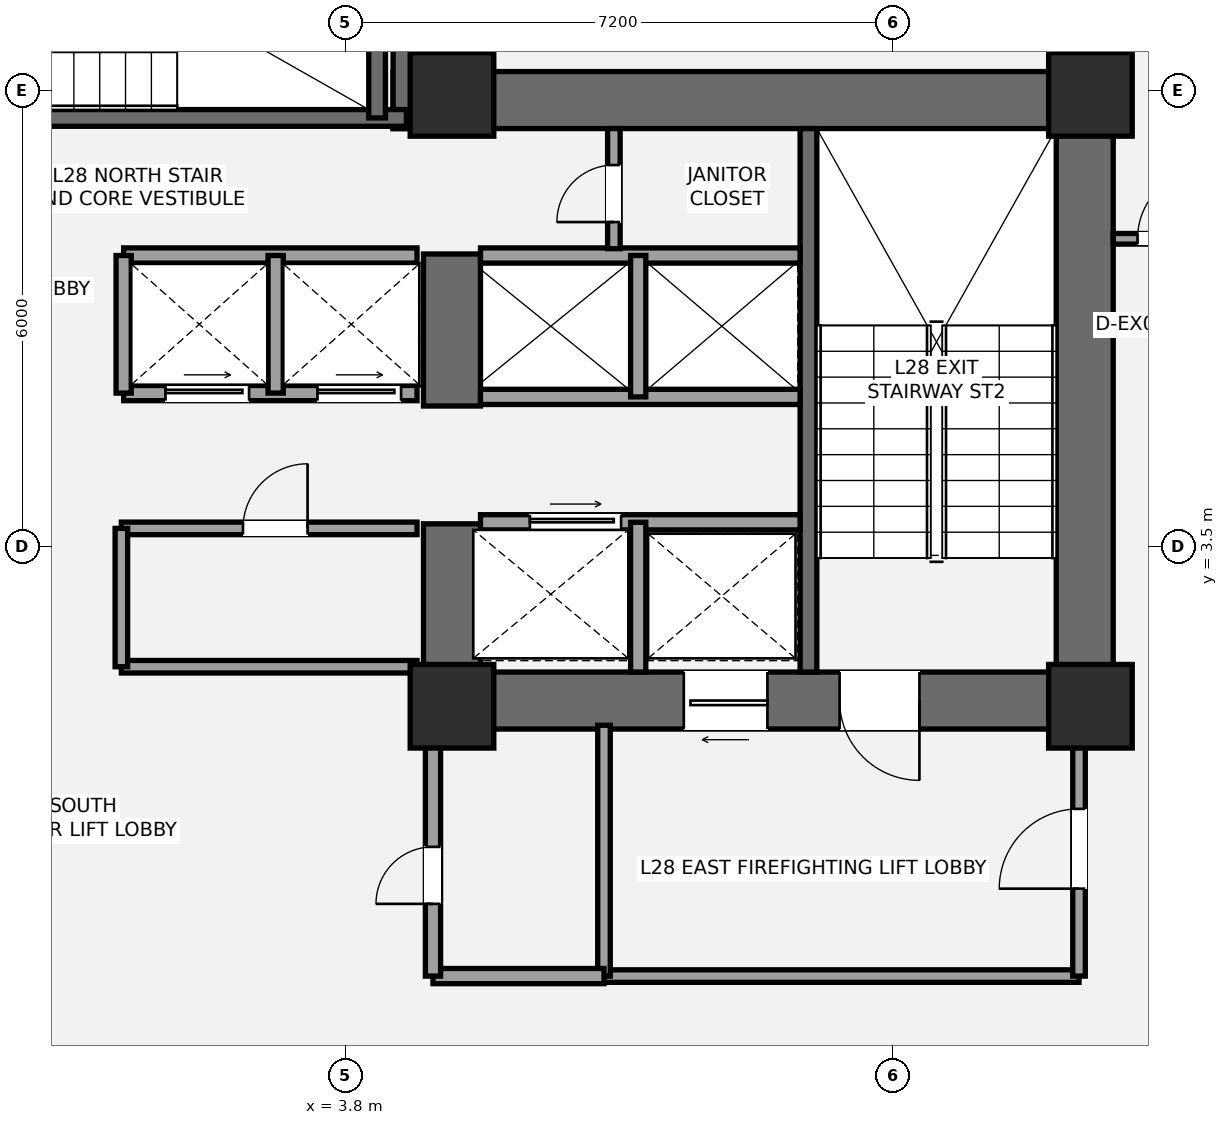
"""IFC4 building model, lengths in metres.
Left out: names, types, materials, properties, quantities, classifications, styles, units other than length and angle.
Written with IfcOpenShell. Run it as: python <this file> out.ifc"""

import sys

from ifc_helpers import new_model, si_unit, direction, frame, frame_2d, origin, origin_2d, place, context, subcontext, project, spatial, rectangle, extrude, element, fill, save


model = new_model("IFC4")
c1 = context("Model", 3, precision=1e-05, world=origin(), true_north=direction((0.0, 1.0)))
c2 = subcontext(c1, "Body", "Model", "MODEL_VIEW")
j1 = project(units=[si_unit("LENGTHUNIT", "METRE"), si_unit("PLANEANGLEUNIT", "RADIAN")], contexts=[c1])
p1 = place(None, origin())
s1 = spatial("IfcSite", under=j1, at=p1, CompositionType="ELEMENT")
p2 = place(p1, origin())
s2 = spatial("IfcBuilding", under=s1, at=p2, CompositionType="ELEMENT")
p3 = place(p2, frame((0.0, 0.0, 107.1)))
s3 = spatial("IfcBuildingStorey", under=s2, at=p3, CompositionType="ELEMENT", Elevation=107.1)
p4 = place(p3, frame((13.525, 1.1, 0.0), z_axis=(0.0, 0.0, 1.0), x_axis=(0.0, 1.0, 0.0)))
e1 = element("IfcWall", 1, at=p4, inside=s3, PredefinedType="SHEAR", context=c2, shape_type="SweptSolid", body=[
    extrude(rectangle(XDim=8.65, YDim=0.75, at=frame_2d((4.325, 0.0))), origin(), (0.0, 0.0, 1.0), 3.5),
])
p5 = place(p3, frame((4.425, 9.375, 0.0), z_axis=(0.0, 0.0, 1.0), x_axis=(1.0, 0.0, 0.0)))
e2 = element("IfcWall", 2, at=p5, inside=s3, PredefinedType="SHEAR", context=c2, shape_type="SweptSolid", body=[
    extrude(rectangle(XDim=9.475, YDim=0.75, at=frame_2d((4.737, 0.0))), origin(), (0.0, 0.0, 1.0), 3.5),
])
p6 = place(p3, frame((13.9, 1.475, 0.0), z_axis=(0.0, 0.0, 1.0), x_axis=(-1.0, 0.0, 0.0)))
e3 = element("IfcWall", 3, at=p6, inside=s3, PredefinedType="SHEAR", context=c2, shape_type="SweptSolid", body=[
    extrude(rectangle(XDim=9.075, YDim=0.75, at=frame_2d((4.538, 0.0))), origin(), (0.0, 0.0, 1.0), 3.5),
])
p7 = place(p6, frame((2.55, 0.0, 0.0)))
e4 = element("IfcOpeningElement", 4, at=p7, cuts=e3, PredefinedType="OPENING", context=c2, shape_type="SweptSolid", body=[
    extrude(rectangle(XDim=1.05, YDim=2.15, at=frame_2d((0.525, 1.075))), frame((0.0, 0.385, 0.0), z_axis=(0.0, -1.0, 0.0), x_axis=(1.0, 0.0, 0.0)), (0.0, 0.0, 1.0), 0.77),
])
p8 = place(p6, frame((4.55, 0.0, 0.0)))
e5 = element("IfcOpeningElement", 5, at=p8, cuts=e3, PredefinedType="OPENING", context=c2, shape_type="SweptSolid", body=[
    extrude(rectangle(XDim=1.1, YDim=2.2, at=frame_2d((0.55, 1.1))), frame((0.0, 0.385, 0.0), z_axis=(0.0, -1.0, 0.0), x_axis=(1.0, 0.0, 0.0)), (0.0, 0.0, 1.0), 0.77),
])
p9 = place(p3, frame((5.2, 1.1, 0.0), z_axis=(0.0, 0.0, 1.0), x_axis=(0.0, 1.0, 0.0)))
e6 = element("IfcWall", 6, at=p9, inside=s3, PredefinedType="SHEAR", context=c2, shape_type="SweptSolid", body=[
    extrude(rectangle(XDim=2.7, YDim=0.75, at=frame_2d((1.35, 0.0))), origin(), (0.0, 0.0, 1.0), 3.5),
])
p10 = place(p3, frame((5.2, 5.35, 0.0), z_axis=(0.0, 0.0, 1.0), x_axis=(0.0, 1.0, 0.0)))
e7 = element("IfcWall", 7, at=p10, inside=s3, PredefinedType="SHEAR", context=c2, shape_type="SweptSolid", body=[
    extrude(rectangle(XDim=2.0, YDim=0.75, at=frame_2d((1.0, 0.0))), origin(), (0.0, 0.0, 1.0), 3.5),
])
p11 = place(p3, frame((9.89, 1.85, 0.0), z_axis=(0.0, 0.0, 1.0), x_axis=(0.0, 1.0, 0.0)))
e8 = element("IfcWall", 8, at=p11, inside=s3, PredefinedType="SHEAR", context=c2, shape_type="SweptSolid", body=[
    extrude(rectangle(XDim=7.15, YDim=0.22, at=frame_2d((3.575, 0.0))), origin(), (0.0, 0.0, 1.0), 3.5),
])
p12 = place(p3, frame((4.8, 9.0, 0.0), z_axis=(0.0, 0.0, 1.0), x_axis=(0.0, 1.0, 0.0)))
e9 = element("IfcWall", 9, at=p12, inside=s3, PredefinedType="SHEAR", context=c2, shape_type="SweptSolid", body=[
    extrude(rectangle(XDim=4.15, YDim=0.75, at=frame_2d((2.075, 0.0))), origin(), (0.0, 0.0, 1.0), 3.5),
])
p13 = place(p3, frame((-4.7, 9.14, 0.0), z_axis=(0.0, 0.0, 1.0), x_axis=(1.0, 0.0, 0.0)))
e10 = element("IfcWall", 10, at=p13, inside=s3, PredefinedType="SHEAR", context=c2, shape_type="SweptSolid", body=[
    extrude(rectangle(XDim=9.3, YDim=0.22, at=frame_2d((4.65, 0.0))), origin(), (0.0, 0.0, 1.0), 3.5),
])
p14 = place(p13, frame((1.15, 0.0, 0.0)))
e11 = element("IfcOpeningElement", 11, at=p14, cuts=e10, PredefinedType="OPENING", context=c2, shape_type="SweptSolid", body=[
    extrude(rectangle(XDim=1.05, YDim=2.15, at=frame_2d((0.525, 1.075))), frame((0.0, 0.12, 0.0), z_axis=(0.0, -1.0, 0.0), x_axis=(1.0, 0.0, 0.0)), (0.0, 0.0, 1.0), 0.24),
])
p15 = place(p3, frame((4.215, 9.14, 0.0), z_axis=(0.0, 0.0, 1.0), x_axis=(0.0, 1.0, 0.0)))
e12 = element("IfcWall", 12, at=p15, inside=s3, PredefinedType="SHEAR", context=c2, shape_type="SweptSolid", body=[
    extrude(rectangle(XDim=3.26, YDim=0.22, at=frame_2d((1.63, 0.0))), origin(), (0.0, 0.0, 1.0), 3.5),
])
for number, where, z_axis, x_axis in (
    (13, (5.2, 1.4, 0.0), (0.0, 0.0, 1.0), (1.0, 0.0, 0.0)),
    (14, (5.2, 9.45, 0.0), (0.0, 0.0, 1.0), (1.0, 0.0, 0.0)),
    (15, (13.6, 1.4, 0.0), (0.0, 0.0, 1.0), (1.0, 0.0, 0.0)),
    (16, (13.6, 9.45, 0.0), (0.0, 0.0, 1.0), (1.0, 0.0, 0.0)),
):
    element("IfcColumn", number, at=place(p3, frame(where, z_axis=z_axis, x_axis=x_axis)), inside=s3, PredefinedType="COLUMN", context=c2, shape_type="SweptSolid", body=[
        extrude(rectangle(XDim=1.1, YDim=1.1, at=origin_2d()), origin(), (0.0, 0.0, 1.0), 3.5),
    ])
p16 = place(p3, frame((7.2, -2.15, 0.0), z_axis=(0.0, 0.0, 1.0), x_axis=(1.0, 0.0, 0.0)))
e17 = element("IfcWall", 17, at=p16, inside=s3, PredefinedType="PARTITIONING", context=c2, shape_type="SweptSolid", body=[
    extrude(rectangle(XDim=6.25, YDim=0.165, at=frame_2d((3.125, 0.0))), origin(), (0.0, 0.0, 1.0), 3.31),
])
p17 = place(p3, frame((7.2, -2.15, 0.0), z_axis=(0.0, 0.0, 1.0), x_axis=(0.0, 1.0, 0.0)))
e18 = element("IfcWall", 18, at=p17, inside=s3, PredefinedType="PARTITIONING", context=c2, shape_type="SweptSolid", body=[
    extrude(rectangle(XDim=3.3, YDim=0.165, at=frame_2d((1.65, 0.0))), origin(), (0.0, 0.0, 1.0), 3.31),
])
p18 = place(p3, frame((13.45, -2.15, 0.0), z_axis=(0.0, 0.0, 1.0), x_axis=(0.0, 1.0, 0.0)))
e19 = element("IfcWall", 19, at=p18, inside=s3, PredefinedType="PARTITIONING", context=c2, shape_type="SweptSolid", body=[
    extrude(rectangle(XDim=3.3, YDim=0.165, at=frame_2d((1.65, 0.0))), origin(), (0.0, 0.0, 1.0), 2.763),
])
p19 = place(p18, frame((1.15, 0.0, 0.0)))
e20 = element("IfcOpeningElement", 20, at=p19, cuts=e19, PredefinedType="OPENING", context=c2, shape_type="SweptSolid", body=[
    extrude(rectangle(XDim=1.05, YDim=2.15, at=frame_2d((0.525, 1.075))), frame((0.0, 0.093, 0.0), z_axis=(0.0, -1.0, 0.0), x_axis=(1.0, 0.0, 0.0)), (0.0, 0.0, 1.0), 0.185),
])
p20 = place(p3, frame((4.95, -2.15, 0.0), z_axis=(0.0, 0.0, 1.0), x_axis=(1.0, 0.0, 0.0)))
e21 = element("IfcWall", 21, at=p20, inside=s3, PredefinedType="SOLIDWALL", context=c2, shape_type="SweptSolid", body=[
    extrude(rectangle(XDim=2.25, YDim=0.2, at=frame_2d((1.125, 0.0))), origin(), (0.0, 0.0, 1.0), 2.763),
])
p21 = place(p3, frame((4.95, -2.15, 0.0), z_axis=(0.0, 0.0, 1.0), x_axis=(0.0, 1.0, 0.0)))
e22 = element("IfcWall", 22, at=p21, inside=s3, PredefinedType="SOLIDWALL", context=c2, shape_type="SweptSolid", body=[
    extrude(rectangle(XDim=3.3, YDim=0.2, at=frame_2d((1.65, 0.0))), origin(), (0.0, 0.0, 1.0), 3.31),
])
p22 = place(p21, frame((0.95, 0.0, 0.0)))
e23 = element("IfcOpeningElement", 23, at=p22, cuts=e22, PredefinedType="OPENING", context=c2, shape_type="SweptSolid", body=[
    extrude(rectangle(XDim=0.75, YDim=2.1, at=frame_2d((0.375, 1.05))), frame((0.0, 0.11, 0.0), z_axis=(0.0, -1.0, 0.0), x_axis=(1.0, 0.0, 0.0)), (0.0, 0.0, 1.0), 0.22),
])
p23 = place(p3, frame((5.575, 3.82, 0.0), z_axis=(0.0, 0.0, 1.0), x_axis=(1.0, 0.0, 0.0)))
e24 = element("IfcWall", 24, at=p23, inside=s3, PredefinedType="SOLIDWALL", context=c2, shape_type="SweptSolid", body=[
    extrude(rectangle(XDim=4.205, YDim=0.2, at=frame_2d((2.103, 0.0))), origin(), (0.0, 0.0, 1.0), 3.31),
])
p24 = place(p23, frame((0.65, 0.0, 0.0)))
e25 = element("IfcOpeningElement", 25, at=p24, cuts=e24, PredefinedType="OPENING", context=c2, shape_type="SweptSolid", body=[
    extrude(rectangle(XDim=1.2, YDim=2.2, at=frame_2d((0.6, 1.1))), frame((0.0, 0.11, 0.0), z_axis=(0.0, -1.0, 0.0), x_axis=(1.0, 0.0, 0.0)), (0.0, 0.0, 1.0), 0.22),
])
p25 = place(p3, frame((7.65, 1.85, 0.0), z_axis=(0.0, 0.0, 1.0), x_axis=(0.0, 1.0, 0.0)))
e26 = element("IfcWall", 26, at=p25, inside=s3, PredefinedType="SOLIDWALL", context=c2, shape_type="SweptSolid", body=[
    extrude(rectangle(XDim=1.97, YDim=0.2, at=frame_2d((0.985, 0.0))), origin(), (0.0, 0.0, 1.0), 3.31),
])
for number, where, z_axis, x_axis in (
    (27, (5.575, 5.47, 0.0), (0.0, 0.0, 1.0), (1.0, 0.0, 0.0)),
    (28, (5.575, 7.33, 0.0), (0.0, 0.0, 1.0), (1.0, 0.0, 0.0)),
):
    element("IfcWall", number, at=place(p3, frame(where, z_axis=z_axis, x_axis=x_axis)), inside=s3, PredefinedType="SOLIDWALL", context=c2, shape_type="SweptSolid", body=[
        extrude(rectangle(XDim=4.205, YDim=0.2, at=frame_2d((2.103, 0.0))), origin(), (0.0, 0.0, 1.0), 3.31),
    ])
p26 = place(p3, frame((7.65, 5.47, 0.0), z_axis=(0.0, 0.0, 1.0), x_axis=(0.0, 1.0, 0.0)))
e29 = element("IfcWall", 29, at=p26, inside=s3, PredefinedType="SOLIDWALL", context=c2, shape_type="SweptSolid", body=[
    extrude(rectangle(XDim=1.86, YDim=0.2, at=frame_2d((0.93, 0.0))), origin(), (0.0, 0.0, 1.0), 3.31),
])
p27 = place(p3, frame((0.85, 1.92, 0.0), z_axis=(0.0, 0.0, 1.0), x_axis=(1.0, 0.0, 0.0)))
e30 = element("IfcWall", 30, at=p27, inside=s3, PredefinedType="PARTITIONING", context=c2, shape_type="SweptSolid", body=[
    extrude(rectangle(XDim=3.89, YDim=0.165, at=frame_2d((1.945, 0.0))), origin(), (0.0, 0.0, 1.0), 2.3),
])
p28 = place(p3, frame((0.85, 3.74, 0.0), z_axis=(0.0, 0.0, 1.0), x_axis=(1.0, 0.0, 0.0)))
e31 = element("IfcWall", 31, at=p28, inside=s3, PredefinedType="PARTITIONING", context=c2, shape_type="SweptSolid", body=[
    extrude(rectangle(XDim=3.89, YDim=0.165, at=frame_2d((1.945, 0.0))), origin(), (0.0, 0.0, 1.0), 3.31),
])
p29 = place(p28, frame((1.6, 0.0, 0.0)))
e32 = element("IfcOpeningElement", 32, at=p29, cuts=e31, PredefinedType="OPENING", context=c2, shape_type="SweptSolid", body=[
    extrude(rectangle(XDim=0.85, YDim=2.1, at=frame_2d((0.425, 1.05))), frame((0.0, 0.093, 0.0), z_axis=(0.0, -1.0, 0.0), x_axis=(1.0, 0.0, 0.0)), (0.0, 0.0, 1.0), 0.185),
])
p30 = place(p3, frame((0.85, 1.92, 0.0), z_axis=(0.0, 0.0, 1.0), x_axis=(0.0, 1.0, 0.0)))
e33 = element("IfcWall", 33, at=p30, inside=s3, PredefinedType="PARTITIONING", context=c2, shape_type="SweptSolid", body=[
    extrude(rectangle(XDim=1.82, YDim=0.165, at=frame_2d((0.91, 0.0))), origin(), (0.0, 0.0, 1.0), 3.31),
])
p31 = place(p3, frame((0.88, 5.52, 0.0), z_axis=(0.0, 0.0, 1.0), x_axis=(1.0, 0.0, 0.0)))
e34 = element("IfcWall", 34, at=p31, inside=s3, PredefinedType="SOLIDWALL", context=c2, shape_type="SweptSolid", body=[
    extrude(rectangle(XDim=3.86, YDim=0.2, at=frame_2d((1.93, 0.0))), origin(), (0.0, 0.0, 1.0), 3.31),
])
p32 = place(p31, frame((0.55, 0.0, 0.0)))
e35 = element("IfcOpeningElement", 35, at=p32, cuts=e34, PredefinedType="OPENING", context=c2, shape_type="SweptSolid", body=[
    extrude(rectangle(XDim=1.1, YDim=2.2, at=frame_2d((0.55, 1.1))), frame((0.0, 0.11, 0.0), z_axis=(0.0, -1.0, 0.0), x_axis=(1.0, 0.0, 0.0)), (0.0, 0.0, 1.0), 0.22),
])
p33 = place(p31, frame((2.55, 0.0, 0.0)))
e36 = element("IfcOpeningElement", 36, at=p33, cuts=e34, PredefinedType="OPENING", context=c2, shape_type="SweptSolid", body=[
    extrude(rectangle(XDim=1.1, YDim=2.2, at=frame_2d((0.55, 1.1))), frame((0.0, 0.11, 0.0), z_axis=(0.0, -1.0, 0.0), x_axis=(1.0, 0.0, 0.0)), (0.0, 0.0, 1.0), 0.22),
])
p34 = place(p3, frame((0.88, 7.33, 0.0), z_axis=(0.0, 0.0, 1.0), x_axis=(1.0, 0.0, 0.0)))
e37 = element("IfcWall", 37, at=p34, inside=s3, PredefinedType="SOLIDWALL", context=c2, shape_type="SweptSolid", body=[
    extrude(rectangle(XDim=3.86, YDim=0.2, at=frame_2d((1.93, 0.0))), origin(), (0.0, 0.0, 1.0), 3.31),
])
for number, where, z_axis, x_axis in (
    (38, (2.88, 5.52, 0.0), (0.0, 0.0, 1.0), (0.0, 1.0, 0.0)),
    (39, (0.88, 5.52, 0.0), (0.0, 0.0, 1.0), (0.0, 1.0, 0.0)),
):
    element("IfcWall", number, at=place(p3, frame(where, z_axis=z_axis, x_axis=x_axis)), inside=s3, PredefinedType="SOLIDWALL", context=c2, shape_type="SweptSolid", body=[
        extrude(rectangle(XDim=1.81, YDim=0.2, at=frame_2d((0.905, 0.0))), origin(), (0.0, 0.0, 1.0), 3.31),
    ])
p35 = place(p3, frame((7.33, 7.42, 0.0), z_axis=(0.0, 0.0, 1.0), x_axis=(0.0, 1.0, 0.0)))
e40 = element("IfcWall", 40, at=p35, inside=s3, PredefinedType="PARTITIONING", context=c2, shape_type="SweptSolid", body=[
    extrude(rectangle(XDim=1.58, YDim=0.165, at=frame_2d((0.79, 0.0))), origin(), (0.0, 0.0, 1.0), 3.31),
])
p36 = place(p35, frame((0.35, 0.0, 0.0)))
e41 = element("IfcOpeningElement", 41, at=p36, cuts=e40, PredefinedType="OPENING", context=c2, shape_type="SweptSolid", body=[
    extrude(rectangle(XDim=0.75, YDim=2.1, at=frame_2d((0.375, 1.05))), frame((0.0, 0.093, 0.0), z_axis=(0.0, -1.0, 0.0), x_axis=(1.0, 0.0, 0.0)), (0.0, 0.0, 1.0), 0.185),
])
p37 = place(p3, frame((13.9, 7.55, 0.0), z_axis=(0.0, 0.0, 1.0), x_axis=(1.0, 0.0, 0.0)))
e42 = element("IfcWall", 42, at=p37, inside=s3, PredefinedType="PARTITIONING", context=c2, shape_type="SweptSolid", body=[
    extrude(rectangle(XDim=1.8, YDim=0.14, at=frame_2d((0.9, 0.0))), origin(), (0.0, 0.0, 1.0), 2.763),
])
p38 = place(p37, frame((0.32, 0.0, 0.0)))
e43 = element("IfcOpeningElement", 43, at=p38, cuts=e42, PredefinedType="OPENING", context=c2, shape_type="SweptSolid", body=[
    extrude(rectangle(XDim=0.92, YDim=2.15, at=frame_2d((0.46, 1.075))), frame((0.0, 0.08, 0.0), z_axis=(0.0, -1.0, 0.0), x_axis=(1.0, 0.0, 0.0)), (0.0, 0.0, 1.0), 0.16),
])
p39 = place(p7, origin())
e44 = element("IfcDoor", 44, at=p39, inside=s3, OperationType="SINGLE_SWING_LEFT", PredefinedType="DOOR", context=c2, shape_type="SweptSolid", body=[
    extrude(rectangle(XDim=1.05, YDim=2.15, at=frame_2d((0.525, 1.075))), frame((0.0, 0.025, 0.0), z_axis=(0.0, -1.0, 0.0), x_axis=(1.0, 0.0, 0.0)), (0.0, 0.0, 1.0), 0.05),
])
fill(e4, e44)
p40 = place(p19, origin())
e45 = element("IfcDoor", 45, at=p40, inside=s3, OperationType="SINGLE_SWING_LEFT", PredefinedType="DOOR", context=c2, shape_type="SweptSolid", body=[
    extrude(rectangle(XDim=1.05, YDim=2.15, at=frame_2d((0.525, 1.075))), frame((0.0, 0.025, 0.0), z_axis=(0.0, -1.0, 0.0), x_axis=(1.0, 0.0, 0.0)), (0.0, 0.0, 1.0), 0.05),
])
fill(e20, e45)
p41 = place(p22, origin())
e46 = element("IfcDoor", 46, at=p41, inside=s3, OperationType="SINGLE_SWING_LEFT", PredefinedType="DOOR", context=c2, shape_type="SweptSolid", body=[
    extrude(rectangle(XDim=0.75, YDim=2.1, at=frame_2d((0.375, 1.05))), frame((0.0, 0.025, 0.0), z_axis=(0.0, -1.0, 0.0), x_axis=(1.0, 0.0, 0.0)), (0.0, 0.0, 1.0), 0.05),
])
fill(e23, e46)
p42 = place(p8, origin())
e47 = element("IfcDoor", 47, at=p42, inside=s3, OperationType="SLIDING_TO_LEFT", PredefinedType="DOOR", context=c2, shape_type="SweptSolid", body=[
    extrude(rectangle(XDim=1.1, YDim=2.2, at=frame_2d((0.55, 1.1))), frame((0.0, 0.025, 0.0), z_axis=(0.0, -1.0, 0.0), x_axis=(1.0, 0.0, 0.0)), (0.0, 0.0, 1.0), 0.05),
])
fill(e5, e47)
p43 = place(p24, origin())
e48 = element("IfcDoor", 48, at=p43, inside=s3, OperationType="SLIDING_TO_RIGHT", PredefinedType="DOOR", context=c2, shape_type="SweptSolid", body=[
    extrude(rectangle(XDim=1.2, YDim=2.2, at=frame_2d((0.6, 1.1))), frame((0.0, 0.025, 0.0), z_axis=(0.0, -1.0, 0.0), x_axis=(1.0, 0.0, 0.0)), (0.0, 0.0, 1.0), 0.05),
])
fill(e25, e48)
p44 = place(p29, origin())
e49 = element("IfcDoor", 49, at=p44, inside=s3, OperationType="SINGLE_SWING_RIGHT", PredefinedType="DOOR", context=c2, shape_type="SweptSolid", body=[
    extrude(rectangle(XDim=0.85, YDim=2.1, at=frame_2d((0.425, 1.05))), frame((0.0, 0.025, 0.0), z_axis=(0.0, -1.0, 0.0), x_axis=(1.0, 0.0, 0.0)), (0.0, 0.0, 1.0), 0.05),
])
fill(e32, e49)
p45 = place(p32, origin())
e50 = element("IfcDoor", 50, at=p45, inside=s3, OperationType="SLIDING_TO_LEFT", PredefinedType="DOOR", context=c2, shape_type="SweptSolid", body=[
    extrude(rectangle(XDim=1.1, YDim=2.2, at=frame_2d((0.55, 1.1))), frame((0.0, 0.025, 0.0), z_axis=(0.0, -1.0, 0.0), x_axis=(1.0, 0.0, 0.0)), (0.0, 0.0, 1.0), 0.05),
])
fill(e35, e50)
p46 = place(p33, origin())
e51 = element("IfcDoor", 51, at=p46, inside=s3, OperationType="SLIDING_TO_LEFT", PredefinedType="DOOR", context=c2, shape_type="SweptSolid", body=[
    extrude(rectangle(XDim=1.1, YDim=2.2, at=frame_2d((0.55, 1.1))), frame((0.0, 0.025, 0.0), z_axis=(0.0, -1.0, 0.0), x_axis=(1.0, 0.0, 0.0)), (0.0, 0.0, 1.0), 0.05),
])
fill(e36, e51)
p47 = place(p36, origin())
e52 = element("IfcDoor", 52, at=p47, inside=s3, OperationType="SINGLE_SWING_LEFT", PredefinedType="DOOR", context=c2, shape_type="SweptSolid", body=[
    extrude(rectangle(XDim=0.75, YDim=2.1, at=frame_2d((0.375, 1.05))), frame((0.0, 0.025, 0.0), z_axis=(0.0, -1.0, 0.0), x_axis=(1.0, 0.0, 0.0)), (0.0, 0.0, 1.0), 0.05),
])
fill(e41, e52)
p48 = place(p38, origin())
e53 = element("IfcDoor", 53, at=p48, inside=s3, OperationType="SINGLE_SWING_RIGHT", PredefinedType="DOOR", context=c2, shape_type="SweptSolid", body=[
    extrude(rectangle(XDim=0.92, YDim=2.15, at=frame_2d((0.46, 1.075))), frame((0.0, 0.025, 0.0), z_axis=(0.0, -1.0, 0.0), x_axis=(1.0, 0.0, 0.0)), (0.0, 0.0, 1.0), 0.05),
])
fill(e43, e53)
save(model, sys.argv[1])
